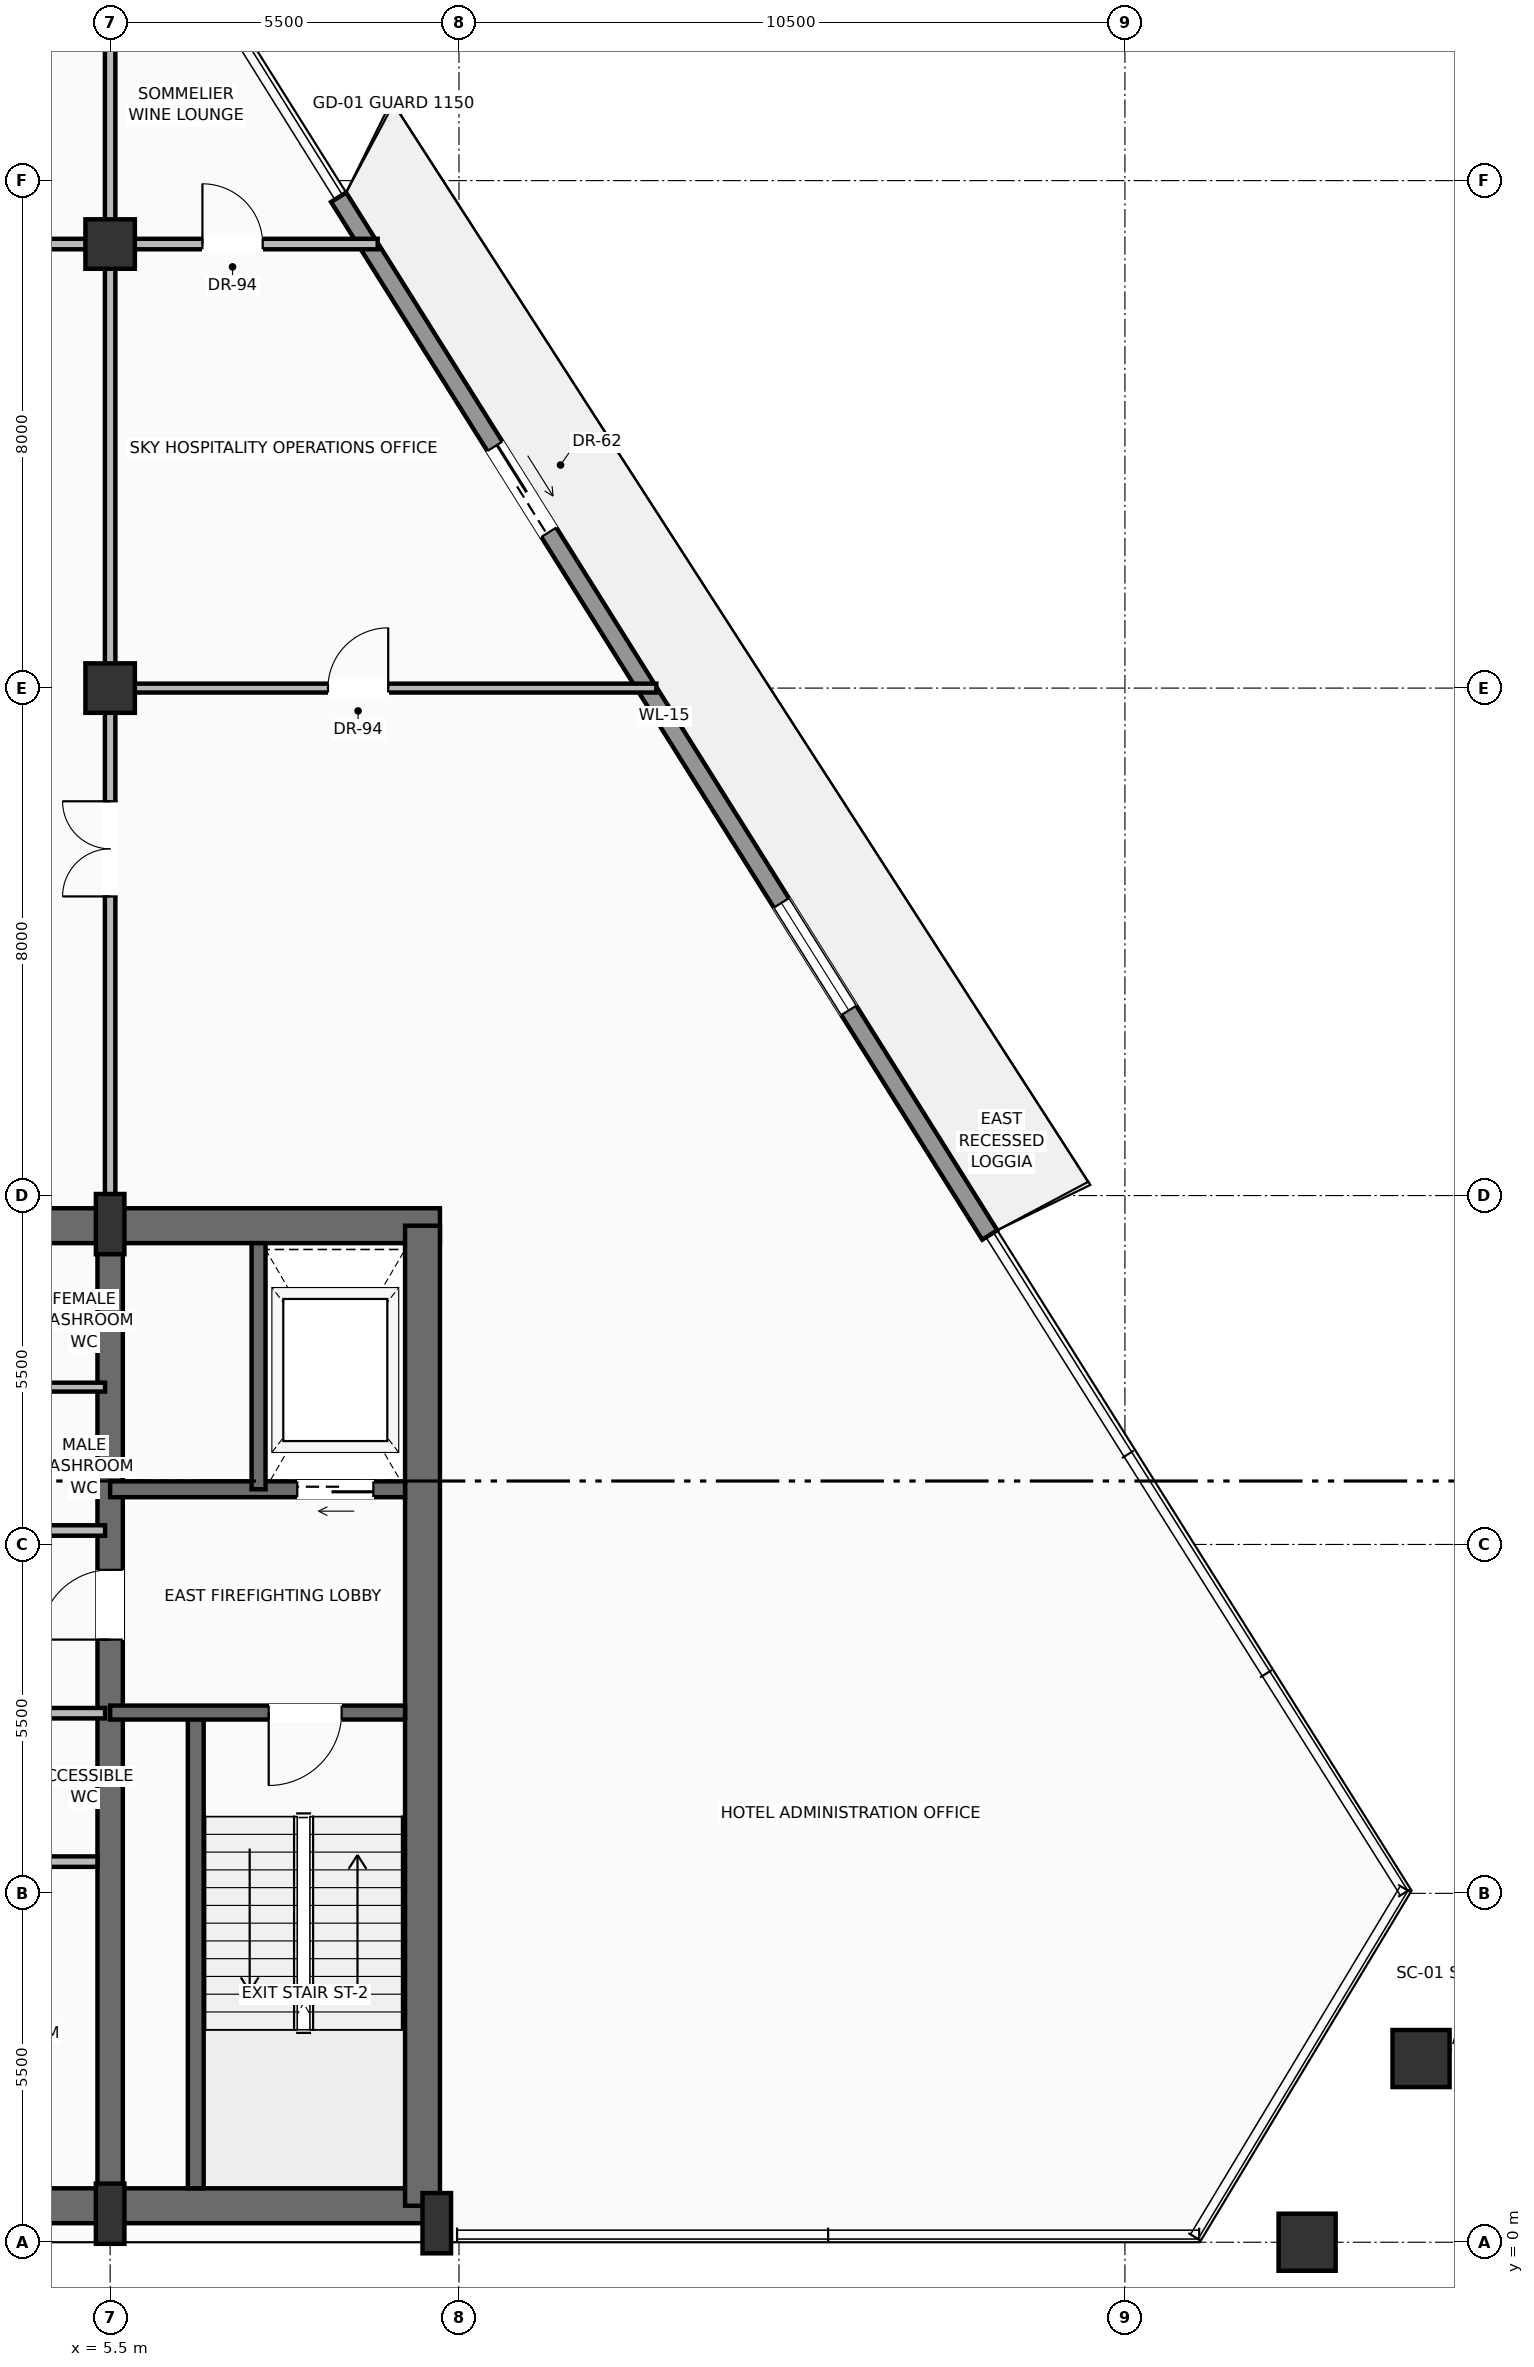
"""IFC4 building model, lengths in metres.
Left out: names, types, materials, properties, quantities, classifications, styles, units other than length and angle.
Written with IfcOpenShell. Run it as: python <this file> out.ifc"""

import sys

from ifc_helpers import new_model, si_unit, direction, frame, frame_2d, origin, origin_2d, place, context, subcontext, project, spatial, rectangle, hollow_rectangle, extrude, source, transform, mapped, element, fill, save


model = new_model("IFC4")
c1 = context("Model", 3, precision=1e-05, world=origin(), true_north=direction((0.0, 1.0)))
c2 = subcontext(c1, "Body", "Model", "MODEL_VIEW")
j1 = project(units=[si_unit("LENGTHUNIT", "METRE"), si_unit("PLANEANGLEUNIT", "RADIAN")], contexts=[c1])
p1 = place(None, origin())
s1 = spatial("IfcSite", under=j1, at=p1, CompositionType="ELEMENT")
p2 = place(p1, origin())
s2 = spatial("IfcBuilding", under=s1, at=p2, CompositionType="ELEMENT")
p3 = place(p2, frame((0.0, 0.0, 215.4)))
s3 = spatial("IfcBuildingStorey", under=s2, at=p3, CompositionType="ELEMENT", Elevation=215.4)
p4 = place(p3, frame((-10.65, 0.575, 0.0), z_axis=(0.0, 0.0, 1.0), x_axis=(1.0, 0.0, 0.0)))
e1 = element("IfcWall", 1, at=p4, inside=s3, PredefinedType="SHEAR", context=c2, shape_type="SweptSolid", body=[
    extrude(rectangle(XDim=21.3, YDim=0.55, at=frame_2d((10.65, 0.0))), origin(), (0.0, 0.0, 1.0), 4.39),
])
p5 = place(p3, frame((-10.7, 16.025, 0.0), z_axis=(0.0, 0.0, 1.0), x_axis=(1.0, 0.0, 0.0)))
e2 = element("IfcWall", 2, at=p5, inside=s3, PredefinedType="SHEAR", context=c2, shape_type="SweptSolid", body=[
    extrude(rectangle(XDim=21.4, YDim=0.55, at=frame_2d((10.7, 0.0))), origin(), (0.0, 0.0, 1.0), 4.39),
])
p6 = place(p5, frame((3.27, 0.0, 0.0)))
e3 = element("IfcOpeningElement", 3, at=p6, cuts=e2, PredefinedType="OPENING", context=c2, shape_type="SweptSolid", body=[
    extrude(rectangle(XDim=1.3, YDim=2.3, at=frame_2d((0.65, 1.15))), frame((0.0, 0.285, 0.0), z_axis=(0.0, -1.0, 0.0), x_axis=(1.0, 0.0, 0.0)), (0.0, 0.0, 1.0), 0.57),
])
p7 = place(p5, frame((9.7, 0.0, 0.0)))
e4 = element("IfcOpeningElement", 4, at=p7, cuts=e2, PredefinedType="OPENING", context=c2, shape_type="SweptSolid", body=[
    extrude(rectangle(XDim=2.0, YDim=2.4, at=frame_2d((1.0, 1.2))), frame((0.0, 0.285, 0.0), z_axis=(0.0, -1.0, 0.0), x_axis=(1.0, 0.0, 0.0)), (0.0, 0.0, 1.0), 0.57),
])
p8 = place(p3, frame((10.425, 0.575, 0.0), z_axis=(0.0, 0.0, 1.0), x_axis=(0.0, 1.0, 0.0)))
e5 = element("IfcWall", 5, at=p8, inside=s3, PredefinedType="SHEAR", context=c2, shape_type="SweptSolid", body=[
    extrude(rectangle(XDim=15.45, YDim=0.55, at=frame_2d((7.725, 0.0))), origin(), (0.0, 0.0, 1.0), 4.39),
])
p9 = place(p3, frame((5.5, 0.575, 0.0), z_axis=(0.0, 0.0, 1.0), x_axis=(0.0, 1.0, 0.0)))
e6 = element("IfcWall", 6, at=p9, inside=s3, PredefinedType="SHEAR", context=c2, shape_type="SweptSolid", body=[
    extrude(rectangle(XDim=15.45, YDim=0.4, at=frame_2d((7.725, 0.0))), origin(), (0.0, 0.0, 1.0), 4.39),
])
p10 = place(p9, frame((8.925, 0.0, 0.0)))
e7 = element("IfcOpeningElement", 7, at=p10, cuts=e6, PredefinedType="OPENING", context=c2, shape_type="SweptSolid", body=[
    extrude(rectangle(XDim=1.1, YDim=2.2, at=frame_2d((0.55, 1.1))), frame((0.0, 0.21, 0.0), z_axis=(0.0, -1.0, 0.0), x_axis=(1.0, 0.0, 0.0)), (0.0, 0.0, 1.0), 0.42),
])
m1 = source(origin(), c2, "Body", "SweptSolid", [
    extrude(rectangle(XDim=0.45, YDim=0.95, at=origin_2d()), origin(), (0.0, 0.0, 1.0), 4.6),
])
for number, where, z_axis, x_axis in (
    (8, (5.5, 0.45, 0.0), (0.0, 0.0, 1.0), (1.0, 0.0, 0.0)),
    (9, (10.65, 0.3, 0.0), (0.0, 0.0, 1.0), (1.0, 0.0, 0.0)),
    (10, (5.5, 16.05, 0.0), (0.0, 0.0, 1.0), (1.0, 0.0, 0.0)),
):
    element("IfcColumn", number, at=place(p3, frame(where, z_axis=z_axis, x_axis=x_axis)), inside=s3, PredefinedType="PILASTER", context=c2, shape_type="MappedRepresentation", body=[
        mapped(m1, transform((0.0, 0.0, 0.0), scale=1.0)),
    ])
m2 = source(origin(), c2, "Body", "SweptSolid", [
    extrude(hollow_rectangle(XDim=0.9, YDim=0.9, WallThickness=0.045, at=origin_2d()), origin(), (0.0, 0.0, 1.0), 4.591),
])
p11 = place(p3, frame((24.372, 0.0, 0.004), z_axis=(0.003562670148, 0.0, 0.999993653671), x_axis=(0.0, 1.0, 0.0)))
e11 = element("IfcColumn", 11, at=p11, inside=s3, PredefinedType="COLUMN", context=c2, shape_type="MappedRepresentation", body=[
    mapped(m2, transform((0.0, 0.0, 0.0), scale=1.0)),
])
m3 = source(origin(), c2, "Body", "SweptSolid", [
    extrude(hollow_rectangle(XDim=0.9, YDim=0.9, WallThickness=0.045, at=origin_2d()), origin(), (0.0, 0.0, 1.0), 4.592),
])
p12 = place(p3, frame((26.169, 2.896, 0.004), z_axis=(-0.00840008425, -0.016853333591, 0.999822686146), x_axis=(0.894991141222, -0.44608391266, 0.0)))
e12 = element("IfcColumn", 12, at=p12, inside=s3, PredefinedType="COLUMN", context=c2, shape_type="MappedRepresentation", body=[
    mapped(m3, transform((0.0, 0.0, 0.0), scale=1.0)),
])
m4 = source(origin(), c2, "Body", "SweptSolid", [
    extrude(rectangle(XDim=0.78, YDim=0.78, at=origin_2d()), origin(), (0.0, 0.0, 1.0), 4.6),
])
for number, where, z_axis, x_axis in (
    (13, (5.5, 24.5, 0.0), (0.0, 0.0, 1.0), (1.0, 0.0, 0.0)),
    (14, (5.5, 31.5, 0.0), (0.0, 0.0, 1.0), (1.0, 0.0, 0.0)),
):
    element("IfcColumn", number, at=place(p3, frame(where, z_axis=z_axis, x_axis=x_axis)), inside=s3, PredefinedType="COLUMN", context=c2, shape_type="MappedRepresentation", body=[
        mapped(m4, transform((0.0, 0.0, 0.0), scale=1.0)),
    ])
p13 = place(p3, frame((9.102, 32.238, 0.0), z_axis=(0.0, 0.0, 1.0), x_axis=(0.531549047002, -0.847027514684, 0.0)))
e15 = element("IfcWall", 15, at=p13, inside=s3, PredefinedType="SOLIDWALL", context=c2, shape_type="SweptSolid", body=[
    extrude(rectangle(XDim=19.313, YDim=0.28, at=frame_2d((9.657, 0.0))), origin(), (0.0, 0.0, 1.0), 3.97),
])
p14 = place(p13, frame((4.635, 0.0, 0.0)))
e16 = element("IfcOpeningElement", 16, at=p14, cuts=e15, PredefinedType="OPENING", context=c2, shape_type="SweptSolid", body=[
    extrude(rectangle(XDim=1.6, YDim=2.35, at=frame_2d((0.8, 1.175))), frame((0.0, 0.15, 0.0), z_axis=(0.0, -1.0, 0.0), x_axis=(1.0, 0.0, 0.0)), (0.0, 0.0, 1.0), 0.3),
])
p15 = place(p13, frame((13.133, 0.0, 0.9)))
e17 = element("IfcOpeningElement", 17, at=p15, cuts=e15, PredefinedType="OPENING", context=c2, shape_type="SweptSolid", body=[
    extrude(rectangle(XDim=2.0, YDim=1.55, at=frame_2d((1.0, 0.775))), frame((0.0, 0.15, 0.0), z_axis=(0.0, -1.0, 0.0), x_axis=(1.0, 0.0, 0.0)), (0.0, 0.0, 1.0), 0.3),
])
p16 = place(p3, frame((6.85, 0.85, 0.0), z_axis=(0.0, 0.0, 1.0), x_axis=(0.0, 1.0, 0.0)))
e18 = element("IfcWall", 18, at=p16, inside=s3, PredefinedType="SOLIDWALL", context=c2, shape_type="SweptSolid", body=[
    extrude(rectangle(XDim=7.5, YDim=0.25, at=frame_2d((3.75, 0.0))), origin(), (0.0, 0.0, 1.0), 4.39),
])
p17 = place(p3, frame((10.15, 8.35, 0.0), z_axis=(0.0, 0.0, 1.0), x_axis=(-1.0, 0.0, 0.0)))
e19 = element("IfcWall", 19, at=p17, inside=s3, PredefinedType="SOLIDWALL", context=c2, shape_type="SweptSolid", body=[
    extrude(rectangle(XDim=4.65, YDim=0.22, at=frame_2d((2.325, 0.0))), origin(), (0.0, 0.0, 1.0), 4.39),
])
p18 = place(p17, frame((1.0, 0.0, 0.0)))
e20 = element("IfcOpeningElement", 20, at=p18, cuts=e19, PredefinedType="OPENING", context=c2, shape_type="SweptSolid", body=[
    extrude(rectangle(XDim=1.15, YDim=2.2, at=frame_2d((0.575, 1.1))), frame((0.0, 0.12, 0.0), z_axis=(0.0, -1.0, 0.0), x_axis=(1.0, 0.0, 0.0)), (0.0, 0.0, 1.0), 0.24),
])
p19 = place(p3, frame((10.15, 11.87, 0.0), z_axis=(0.0, 0.0, 1.0), x_axis=(-1.0, 0.0, 0.0)))
e21 = element("IfcWall", 21, at=p19, inside=s3, PredefinedType="SOLIDWALL", context=c2, shape_type="SweptSolid", body=[
    extrude(rectangle(XDim=4.65, YDim=0.25, at=frame_2d((2.325, 0.0))), origin(), (0.0, 0.0, 1.0), 4.39),
])
p20 = place(p19, frame((0.5, 0.0, 0.0)))
e22 = element("IfcOpeningElement", 22, at=p20, cuts=e21, PredefinedType="OPENING", context=c2, shape_type="SweptSolid", body=[
    extrude(rectangle(XDim=1.2, YDim=2.25, at=frame_2d((0.6, 1.125))), frame((0.0, 0.135, 0.0), z_axis=(0.0, -1.0, 0.0), x_axis=(1.0, 0.0, 0.0)), (0.0, 0.0, 1.0), 0.27),
])
p21 = place(p3, frame((7.84, 11.87, 0.0), z_axis=(0.0, 0.0, 1.0), x_axis=(0.0, 1.0, 0.0)))
e23 = element("IfcWall", 23, at=p21, inside=s3, PredefinedType="SOLIDWALL", context=c2, shape_type="SweptSolid", body=[
    extrude(rectangle(XDim=3.88, YDim=0.22, at=frame_2d((1.94, 0.0))), origin(), (0.0, 0.0, 1.0), 4.39),
])
p22 = place(p3, frame((1.82, 6.0, 0.0), z_axis=(0.0, 0.0, 1.0), x_axis=(1.0, 0.0, 0.0)))
e24 = element("IfcWall", 24, at=p22, inside=s3, PredefinedType="PARTITIONING", context=c2, shape_type="SweptSolid", body=[
    extrude(rectangle(XDim=3.48, YDim=0.165, at=frame_2d((1.74, 0.0))), origin(), (0.0, 0.0, 1.0), 4.382),
])
p23 = place(p22, frame((0.38, 0.0, 0.0)))
e25 = element("IfcOpeningElement", 25, at=p23, cuts=e24, PredefinedType="OPENING", context=c2, shape_type="SweptSolid", body=[
    extrude(rectangle(XDim=0.9, YDim=2.1, at=frame_2d((0.45, 1.05))), frame((0.0, 0.093, 0.0), z_axis=(0.0, -1.0, 0.0), x_axis=(1.0, 0.0, 0.0)), (0.0, 0.0, 1.0), 0.185),
])
for number, where, z_axis, x_axis in (
    (26, (3.54, 8.34, 0.0), (0.0, 0.0, 1.0), (1.0, 0.0, 0.0)),
    (27, (3.54, 11.22, 0.0), (0.0, 0.0, 1.0), (1.0, 0.0, 0.0)),
):
    element("IfcWall", number, at=place(p3, frame(where, z_axis=z_axis, x_axis=x_axis)), inside=s3, PredefinedType="PARTITIONING", context=c2, shape_type="SweptSolid", body=[
        extrude(rectangle(XDim=1.88, YDim=0.165, at=frame_2d((0.94, 0.0))), origin(), (0.0, 0.0, 1.0), 4.382),
    ])
p24 = place(p3, frame((3.54, 13.48, 0.0), z_axis=(0.0, 0.0, 1.0), x_axis=(1.0, 0.0, 0.0)))
e28 = element("IfcWall", 28, at=p24, inside=s3, PredefinedType="PARTITIONING", context=c2, shape_type="SweptSolid", body=[
    extrude(rectangle(XDim=1.88, YDim=0.14, at=frame_2d((0.94, 0.0))), origin(), (0.0, 0.0, 1.0), 4.382),
])
p25 = place(p3, frame((-10.509, 31.5, 0.0), z_axis=(0.0, 0.0, 1.0), x_axis=(1.0, 0.0, 0.0)))
e29 = element("IfcWall", 29, at=p25, inside=s3, PredefinedType="PARTITIONING", context=c2, shape_type="SweptSolid", body=[
    extrude(rectangle(XDim=20.228, YDim=0.165, at=frame_2d((10.114, 0.0))), origin(), (0.0, 0.0, 1.0), 3.833),
])
p26 = place(p25, frame((9.114, 0.0, 0.0)))
e30 = element("IfcOpeningElement", 30, at=p26, cuts=e29, PredefinedType="OPENING", context=c2, shape_type="SweptSolid", body=[
    extrude(rectangle(XDim=2.0, YDim=2.4, at=frame_2d((1.0, 1.2))), frame((0.0, 0.093, 0.0), z_axis=(0.0, -1.0, 0.0), x_axis=(1.0, 0.0, 0.0)), (0.0, 0.0, 1.0), 0.185),
])
p27 = place(p25, frame((17.464, 0.0, 0.0)))
e31 = element("IfcOpeningElement", 31, at=p27, cuts=e29, PredefinedType="OPENING", context=c2, shape_type="SweptSolid", body=[
    extrude(rectangle(XDim=0.95, YDim=2.2, at=frame_2d((0.475, 1.1))), frame((0.0, 0.093, 0.0), z_axis=(0.0, -1.0, 0.0), x_axis=(1.0, 0.0, 0.0)), (0.0, 0.0, 1.0), 0.185),
])
p28 = place(p25, frame((2.195, 0.0, 0.0)))
e32 = element("IfcOpeningElement", 32, at=p28, cuts=e29, PredefinedType="OPENING", context=c2, shape_type="SweptSolid", body=[
    extrude(rectangle(XDim=0.95, YDim=2.2, at=frame_2d((0.475, 1.1))), frame((0.0, 0.093, 0.0), z_axis=(0.0, -1.0, 0.0), x_axis=(1.0, 0.0, 0.0)), (0.0, 0.0, 1.0), 0.185),
])
p29 = place(p3, frame((5.5, 16.32, 0.0), z_axis=(0.0, 0.0, 1.0), x_axis=(0.0, 1.0, 0.0)))
e33 = element("IfcWall", 33, at=p29, inside=s3, PredefinedType="PARTITIONING", context=c2, shape_type="SweptSolid", body=[
    extrude(rectangle(XDim=21.902, YDim=0.165, at=frame_2d((10.951, 0.0))), origin(), (0.0, 0.0, 1.0), 3.833),
])
p30 = place(p29, frame((4.896, 0.0, 0.0)))
e34 = element("IfcOpeningElement", 34, at=p30, cuts=e33, PredefinedType="OPENING", context=c2, shape_type="SweptSolid", body=[
    extrude(rectangle(XDim=1.5, YDim=2.25, at=frame_2d((0.75, 1.125))), frame((0.0, 0.093, 0.0), z_axis=(0.0, -1.0, 0.0), x_axis=(1.0, 0.0, 0.0)), (0.0, 0.0, 1.0), 0.185),
])
p31 = place(p3, frame((5.5, 24.5, 0.0), z_axis=(0.0, 0.0, 1.0), x_axis=(1.0, 0.0, 0.0)))
e35 = element("IfcWall", 35, at=p31, inside=s3, PredefinedType="PARTITIONING", context=c2, shape_type="SweptSolid", body=[
    extrude(rectangle(XDim=8.612, YDim=0.14, at=frame_2d((4.306, 0.0))), origin(), (0.0, 0.0, 1.0), 3.833),
])
p32 = place(p31, frame((3.434, 0.0, 0.0)))
e36 = element("IfcOpeningElement", 36, at=p32, cuts=e35, PredefinedType="OPENING", context=c2, shape_type="SweptSolid", body=[
    extrude(rectangle(XDim=0.95, YDim=2.2, at=frame_2d((0.475, 1.1))), frame((0.0, 0.08, 0.0), z_axis=(0.0, -1.0, 0.0), x_axis=(1.0, 0.0, 0.0)), (0.0, 0.0, 1.0), 0.16),
])
m5 = source(origin(), c2, "Body", "SweptSolid", [
    extrude(rectangle(XDim=1.6, YDim=2.35, at=frame_2d((0.8, 1.175))), frame((0.0, 0.025, 0.0), z_axis=(0.0, -1.0, 0.0), x_axis=(1.0, 0.0, 0.0)), (0.0, 0.0, 1.0), 0.05),
])
p33 = place(p14, origin())
e37 = element("IfcDoor", 37, at=p33, inside=s3, OperationType="SLIDING_TO_RIGHT", PredefinedType="DOOR", context=c2, shape_type="MappedRepresentation", body=[
    mapped(m5, transform((0.0, 0.0, 0.0), scale=1.0)),
])
fill(e16, e37)
m6 = source(origin(), c2, "Body", "SweptSolid", [
    extrude(rectangle(XDim=2.0, YDim=1.55, at=frame_2d((1.0, 0.775))), frame((0.0, 0.03, 0.0), z_axis=(0.0, -1.0, 0.0), x_axis=(1.0, 0.0, 0.0)), (0.0, 0.0, 1.0), 0.06),
])
p34 = place(p15, origin())
e38 = element("IfcWindow", 38, at=p34, inside=s3, PartitioningType="SINGLE_PANEL", PredefinedType="WINDOW", context=c2, shape_type="MappedRepresentation", body=[
    mapped(m6, transform((0.0, 0.0, 0.0), scale=1.0)),
])
fill(e17, e38)
m7 = source(origin(), c2, "Body", "SweptSolid", [
    extrude(rectangle(XDim=1.15, YDim=2.2, at=frame_2d((0.575, 1.1))), frame((0.0, 0.025, 0.0), z_axis=(0.0, -1.0, 0.0), x_axis=(1.0, 0.0, 0.0)), (0.0, 0.0, 1.0), 0.05),
])
p35 = place(p18, origin())
e39 = element("IfcDoor", 39, at=p35, inside=s3, OperationType="SINGLE_SWING_RIGHT", PredefinedType="DOOR", context=c2, shape_type="MappedRepresentation", body=[
    mapped(m7, transform((0.0, 0.0, 0.0), scale=1.0)),
])
fill(e20, e39)
m8 = source(origin(), c2, "Body", "SweptSolid", [
    extrude(rectangle(XDim=1.1, YDim=2.2, at=frame_2d((0.55, 1.1))), frame((0.0, 0.025, 0.0), z_axis=(0.0, -1.0, 0.0), x_axis=(1.0, 0.0, 0.0)), (0.0, 0.0, 1.0), 0.05),
])
p36 = place(p10, origin())
e40 = element("IfcDoor", 40, at=p36, inside=s3, OperationType="SINGLE_SWING_LEFT", PredefinedType="DOOR", context=c2, shape_type="MappedRepresentation", body=[
    mapped(m8, transform((0.0, 0.0, 0.0), scale=1.0)),
])
fill(e7, e40)
m9 = source(origin(), c2, "Body", "SweptSolid", [
    extrude(rectangle(XDim=1.2, YDim=2.25, at=frame_2d((0.6, 1.125))), frame((0.0, 0.025, 0.0), z_axis=(0.0, -1.0, 0.0), x_axis=(1.0, 0.0, 0.0)), (0.0, 0.0, 1.0), 0.05),
])
p37 = place(p20, origin())
e41 = element("IfcDoor", 41, at=p37, inside=s3, OperationType="SLIDING_TO_RIGHT", PredefinedType="DOOR", context=c2, shape_type="MappedRepresentation", body=[
    mapped(m9, transform((0.0, 0.0, 0.0), scale=1.0)),
])
fill(e22, e41)
m10 = source(origin(), c2, "Body", "SweptSolid", [
    extrude(rectangle(XDim=1.5, YDim=2.25, at=frame_2d((0.75, 1.125))), frame((0.0, 0.025, 0.0), z_axis=(0.0, -1.0, 0.0), x_axis=(1.0, 0.0, 0.0)), (0.0, 0.0, 1.0), 0.05),
])
p38 = place(p30, origin())
e42 = element("IfcDoor", 42, at=p38, inside=s3, OperationType="DOUBLE_DOOR_SINGLE_SWING", PredefinedType="DOOR", context=c2, shape_type="MappedRepresentation", body=[
    mapped(m10, transform((0.0, 0.0, 0.0), scale=1.0)),
])
fill(e34, e42)
m11 = source(origin(), c2, "Body", "SweptSolid", [
    extrude(rectangle(XDim=0.95, YDim=2.2, at=frame_2d((0.475, 1.1))), frame((0.0, 0.025, 0.0), z_axis=(0.0, -1.0, 0.0), x_axis=(1.0, 0.0, 0.0)), (0.0, 0.0, 1.0), 0.05),
])
p39 = place(p32, origin())
e43 = element("IfcDoor", 43, at=p39, inside=s3, OperationType="SINGLE_SWING_RIGHT", PredefinedType="DOOR", context=c2, shape_type="MappedRepresentation", body=[
    mapped(m11, transform((0.0, 0.0, 0.0), scale=1.0)),
])
fill(e36, e43)
p40 = place(p27, origin())
e44 = element("IfcDoor", 44, at=p40, inside=s3, OperationType="SINGLE_SWING_LEFT", PredefinedType="DOOR", context=c2, shape_type="MappedRepresentation", body=[
    mapped(m11, transform((0.0, 0.0, 0.0), scale=1.0)),
])
fill(e31, e44)
save(model, sys.argv[1])
